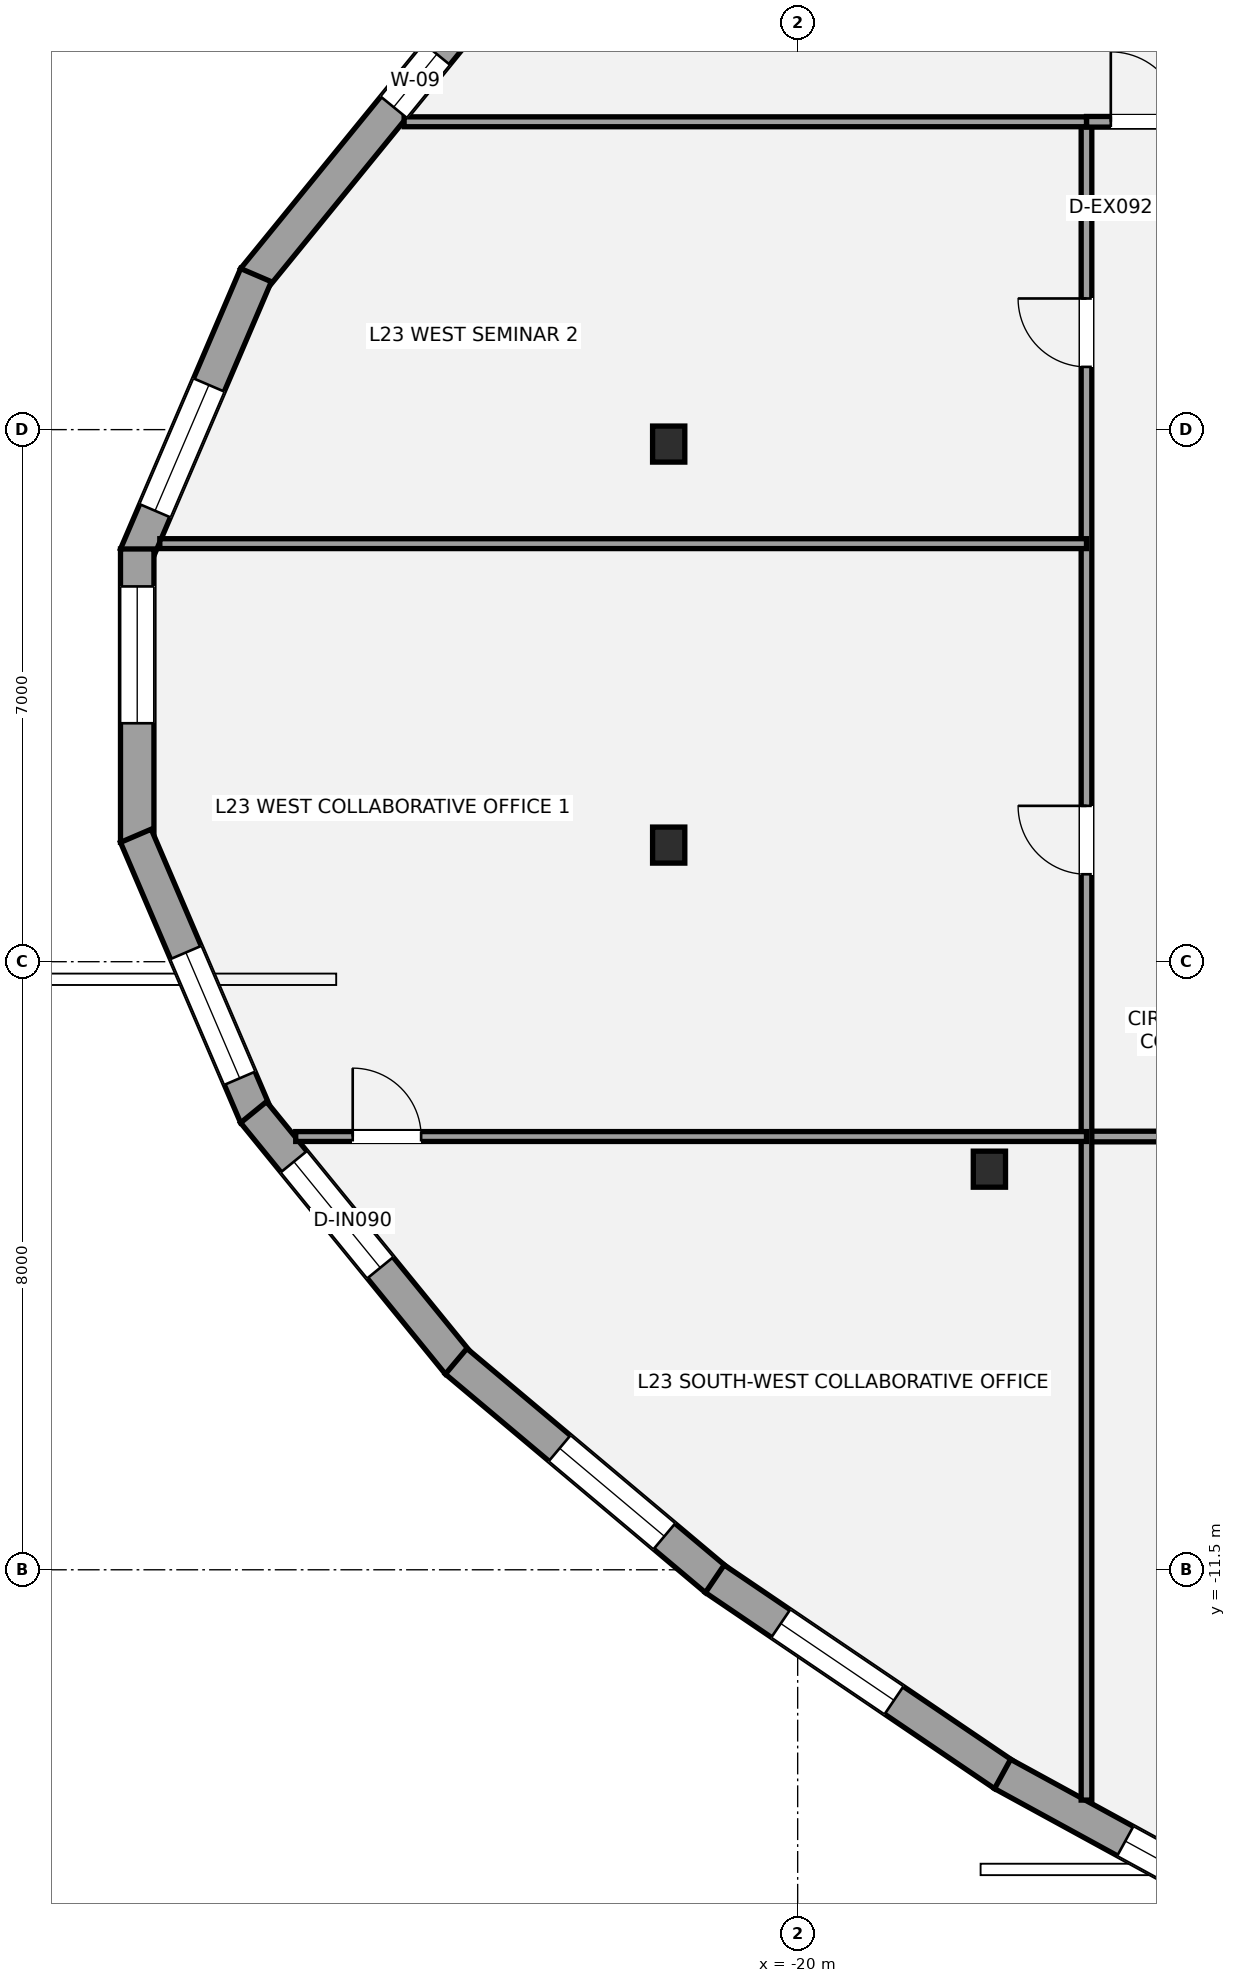
"""IFC4 building model, lengths in metres.
Left out: names, types, materials, properties, quantities, classifications, styles, units other than length and angle.
Written with IfcOpenShell. Run it as: python <this file> out.ifc"""

import sys

from ifc_helpers import new_model, si_unit, direction, frame, frame_2d, origin, origin_2d, place, context, subcontext, project, spatial, rectangle, i_section, extrude, element, fill, save


model = new_model("IFC4")
c1 = context("Model", 3, precision=1e-05, world=origin(), true_north=direction((0.0, 1.0)))
c2 = subcontext(c1, "Body", "Model", "MODEL_VIEW")
j1 = project(units=[si_unit("LENGTHUNIT", "METRE"), si_unit("PLANEANGLEUNIT", "RADIAN")], contexts=[c1])
p1 = place(None, origin())
s1 = spatial("IfcSite", under=j1, at=p1, CompositionType="ELEMENT")
p2 = place(p1, origin())
s2 = spatial("IfcBuilding", under=s1, at=p2, CompositionType="ELEMENT")
p3 = place(p2, frame((0.0, 0.0, 89.6)))
s3 = spatial("IfcBuildingStorey", under=s2, at=p3, CompositionType="ELEMENT", Elevation=89.6)
for number, where, z_axis, x_axis in (
    (1, (-21.697, 3.31, 0.0), (0.0, 0.0, 1.0), (1.0, 0.0, 0.0)),
    (2, (-21.697, -1.966, 0.0), (0.0, 0.0, 1.0), (1.0, 0.0, 0.0)),
    (3, (-17.477, -6.229, 0.0), (0.0, 0.0, 1.0), (1.0, 0.0, 0.0)),
):
    element("IfcColumn", number, at=place(p3, frame(where, z_axis=z_axis, x_axis=x_axis)), inside=s3, PredefinedType="COLUMN", context=c2, shape_type="SweptSolid", body=[
        extrude(i_section(OverallWidth=0.424, OverallDepth=0.474, WebThickness=0.048, FlangeThickness=0.077, at=origin_2d()), origin(), (0.0, 0.0, 1.0), 3.5),
    ])
p4 = place(p3, frame((-27.159, 5.48, 0.0), z_axis=(0.0, 0.0, 1.0), x_axis=(0.631768505266, 0.775157116818, 0.0)))
e4 = element("IfcWall", 4, at=p4, inside=s3, PredefinedType="STANDARD", context=c2, shape_type="SweptSolid", body=[
    extrude(rectangle(XDim=4.265, YDim=0.44, at=frame_2d((2.133, 0.0))), origin(), (0.0, 0.0, 1.0), 2.528),
])
p5 = place(p4, frame((2.918, 0.0, 0.58)))
e5 = element("IfcOpeningElement", 5, at=p5, cuts=e4, PredefinedType="OPENING", context=c2, shape_type="SweptSolid", body=[
    extrude(rectangle(XDim=0.9, YDim=1.35, at=frame_2d((0.45, 0.675))), frame((0.0, 0.23, 0.0), z_axis=(0.0, -1.0, 0.0), x_axis=(1.0, 0.0, 0.0)), (0.0, 0.0, 1.0), 0.46),
])
p6 = place(p3, frame((-28.708, 1.844, 0.0), z_axis=(0.0, 0.0, 1.0), x_axis=(0.393757776232, 0.919214237083, 0.0)))
e6 = element("IfcWall", 6, at=p6, inside=s3, PredefinedType="STANDARD", context=c2, shape_type="SweptSolid", body=[
    extrude(rectangle(XDim=4.013, YDim=0.44, at=frame_2d((2.007, 0.0))), origin(), (0.0, 0.0, 1.0), 2.528),
])
p7 = place(p6, frame((0.641, 0.0, 0.65)))
e7 = element("IfcOpeningElement", 7, at=p7, cuts=e6, PredefinedType="OPENING", context=c2, shape_type="SweptSolid", body=[
    extrude(rectangle(XDim=1.8, YDim=1.7, at=frame_2d((0.9, 0.85))), frame((0.0, 0.23, 0.0), z_axis=(0.0, -1.0, 0.0), x_axis=(1.0, 0.0, 0.0)), (0.0, 0.0, 1.0), 0.46),
])
p8 = place(p3, frame((-28.69, -1.93, 0.0), z_axis=(0.0, 0.0, 1.0), x_axis=(0.0, 1.0, 0.0)))
e8 = element("IfcWall", 8, at=p8, inside=s3, PredefinedType="STANDARD", context=c2, shape_type="SweptSolid", body=[
    extrude(rectangle(XDim=3.86, YDim=0.44, at=frame_2d((1.93, 0.0))), origin(), (0.0, 0.0, 1.0), 2.528),
])
p9 = place(p8, frame((1.567, 0.0, 0.65)))
e9 = element("IfcOpeningElement", 9, at=p9, cuts=e8, PredefinedType="OPENING", context=c2, shape_type="SweptSolid", body=[
    extrude(rectangle(XDim=1.8, YDim=1.7, at=frame_2d((0.9, 0.85))), frame((0.0, 0.23, 0.0), z_axis=(0.0, -1.0, 0.0), x_axis=(1.0, 0.0, 0.0)), (0.0, 0.0, 1.0), 0.46),
])
p10 = place(p3, frame((-27.127, -5.533, 0.0), z_axis=(0.0, 0.0, 1.0), x_axis=(-0.393757776232, 0.919214237083, 0.0)))
e10 = element("IfcWall", 10, at=p10, inside=s3, PredefinedType="STANDARD", context=c2, shape_type="SweptSolid", body=[
    extrude(rectangle(XDim=4.013, YDim=0.44, at=frame_2d((2.007, 0.0))), origin(), (0.0, 0.0, 1.0), 2.528),
])
p11 = place(p10, frame((0.543, 0.0, 0.65)))
e11 = element("IfcOpeningElement", 11, at=p11, cuts=e10, PredefinedType="OPENING", context=c2, shape_type="SweptSolid", body=[
    extrude(rectangle(XDim=1.8, YDim=1.7, at=frame_2d((0.9, 0.85))), frame((0.0, 0.23, 0.0), z_axis=(0.0, -1.0, 0.0), x_axis=(1.0, 0.0, 0.0)), (0.0, 0.0, 1.0), 0.46),
])
p12 = place(p3, frame((-24.464, -8.787, 0.0), z_axis=(0.0, 0.0, 1.0), x_axis=(-0.631768505266, 0.775157116818, 0.0)))
e12 = element("IfcWall", 12, at=p12, inside=s3, PredefinedType="STANDARD", context=c2, shape_type="SweptSolid", body=[
    extrude(rectangle(XDim=4.265, YDim=0.44, at=frame_2d((2.133, 0.0))), origin(), (0.0, 0.0, 1.0), 2.528),
])
p13 = place(p12, frame((1.626, 0.0, 0.65)))
e13 = element("IfcOpeningElement", 13, at=p13, cuts=e12, PredefinedType="OPENING", context=c2, shape_type="SweptSolid", body=[
    extrude(rectangle(XDim=1.8, YDim=1.7, at=frame_2d((0.9, 0.85))), frame((0.0, 0.23, 0.0), z_axis=(0.0, -1.0, 0.0), x_axis=(1.0, 0.0, 0.0)), (0.0, 0.0, 1.0), 0.46),
])
p14 = place(p3, frame((-21.072, -11.632, 0.0), z_axis=(0.0, 0.0, 1.0), x_axis=(-0.765563867956, 0.643359902449, 0.0)))
e14 = element("IfcWall", 14, at=p14, inside=s3, PredefinedType="STANDARD", context=c2, shape_type="SweptSolid", body=[
    extrude(rectangle(XDim=4.469, YDim=0.44, at=frame_2d((2.234, 0.0))), origin(), (0.0, 0.0, 1.0), 2.528),
])
p15 = place(p14, frame((0.891, 0.0, 0.65)))
e15 = element("IfcOpeningElement", 15, at=p15, cuts=e14, PredefinedType="OPENING", context=c2, shape_type="SweptSolid", body=[
    extrude(rectangle(XDim=1.8, YDim=1.7, at=frame_2d((0.9, 0.85))), frame((0.0, 0.23, 0.0), z_axis=(0.0, -1.0, 0.0), x_axis=(1.0, 0.0, 0.0)), (0.0, 0.0, 1.0), 0.46),
])
p16 = place(p3, frame((-17.286, -14.197, 0.0), z_axis=(0.0, 0.0, 1.0), x_axis=(-0.827742791179, 0.561107718403, 0.0)))
e16 = element("IfcWall", 16, at=p16, inside=s3, PredefinedType="STANDARD", context=c2, shape_type="SweptSolid", body=[
    extrude(rectangle(XDim=4.595, YDim=0.44, at=frame_2d((2.298, 0.0))), origin(), (0.0, 0.0, 1.0), 2.528),
])
p17 = place(p16, frame((1.747, 0.0, 0.65)))
e17 = element("IfcOpeningElement", 17, at=p17, cuts=e16, PredefinedType="OPENING", context=c2, shape_type="SweptSolid", body=[
    extrude(rectangle(XDim=1.8, YDim=1.7, at=frame_2d((0.9, 0.85))), frame((0.0, 0.23, 0.0), z_axis=(0.0, -1.0, 0.0), x_axis=(1.0, 0.0, 0.0)), (0.0, 0.0, 1.0), 0.46),
])
p18 = place(p3, frame((-13.062, -16.505, 0.0), z_axis=(0.0, 0.0, 1.0), x_axis=(-0.877445532469, 0.479676284123, 0.0)))
e18 = element("IfcWall", 18, at=p18, inside=s3, PredefinedType="STANDARD", context=c2, shape_type="SweptSolid", body=[
    extrude(rectangle(XDim=4.835, YDim=0.44, at=frame_2d((2.417, 0.0))), origin(), (0.0, 0.0, 1.0), 2.528),
])
p19 = place(p18, frame((1.194, 0.0, 0.65)))
e19 = element("IfcOpeningElement", 19, at=p19, cuts=e18, PredefinedType="OPENING", context=c2, shape_type="SweptSolid", body=[
    extrude(rectangle(XDim=1.8, YDim=1.7, at=frame_2d((0.9, 0.85))), frame((0.0, 0.23, 0.0), z_axis=(0.0, -1.0, 0.0), x_axis=(1.0, 0.0, 0.0)), (0.0, 0.0, 1.0), 0.46),
])
p20 = place(p3, frame((-16.2, -5.8, 0.0), z_axis=(0.0, 0.0, 1.0), x_axis=(1.0, 0.0, 0.0)))
e20 = element("IfcWall", 20, at=p20, inside=s3, PredefinedType="PARTITIONING", context=c2, shape_type="SweptSolid", body=[
    extrude(rectangle(XDim=32.4, YDim=0.14, at=frame_2d((16.2, 0.0))), origin(), (0.0, 0.0, 1.0), 2.763),
])
p21 = place(p20, frame((4.25, 0.0, 0.0)))
e21 = element("IfcOpeningElement", 21, at=p21, cuts=e20, PredefinedType="OPENING", context=c2, shape_type="SweptSolid", body=[
    extrude(rectangle(XDim=0.9, YDim=2.1, at=frame_2d((0.45, 1.05))), frame((0.0, 0.08, 0.0), z_axis=(0.0, -1.0, 0.0), x_axis=(1.0, 0.0, 0.0)), (0.0, 0.0, 1.0), 0.16),
])
p22 = place(p20, frame((13.15, 0.0, 0.0)))
e22 = element("IfcOpeningElement", 22, at=p22, cuts=e20, PredefinedType="OPENING", context=c2, shape_type="SweptSolid", body=[
    extrude(rectangle(XDim=1.5, YDim=2.15, at=frame_2d((0.75, 1.075))), frame((0.0, 0.08, 0.0), z_axis=(0.0, -1.0, 0.0), x_axis=(1.0, 0.0, 0.0)), (0.0, 0.0, 1.0), 0.16),
])
p23 = place(p20, frame((21.45, 0.0, 0.0)))
e23 = element("IfcOpeningElement", 23, at=p23, cuts=e20, PredefinedType="OPENING", context=c2, shape_type="SweptSolid", body=[
    extrude(rectangle(XDim=0.9, YDim=2.1, at=frame_2d((0.45, 1.05))), frame((0.0, 0.08, 0.0), z_axis=(0.0, -1.0, 0.0), x_axis=(1.0, 0.0, 0.0)), (0.0, 0.0, 1.0), 0.16),
])
p24 = place(p20, frame((28.15, 0.0, 0.0)))
e24 = element("IfcOpeningElement", 24, at=p24, cuts=e20, PredefinedType="OPENING", context=c2, shape_type="SweptSolid", body=[
    extrude(rectangle(XDim=1.5, YDim=2.15, at=frame_2d((0.75, 1.075))), frame((0.0, 0.08, 0.0), z_axis=(0.0, -1.0, 0.0), x_axis=(1.0, 0.0, 0.0)), (0.0, 0.0, 1.0), 0.16),
])
p25 = place(p3, frame((-16.2, -14.53, 0.0), z_axis=(0.0, 0.0, 1.0), x_axis=(0.0, 1.0, 0.0)))
e25 = element("IfcWall", 25, at=p25, inside=s3, PredefinedType="PARTITIONING", context=c2, shape_type="SweptSolid", body=[
    extrude(rectangle(XDim=22.08, YDim=0.14, at=frame_2d((11.04, 0.0))), origin(), (0.0, 0.0, 1.0), 2.751),
])
p26 = place(p25, frame((12.18, 0.0, 0.0)))
e26 = element("IfcOpeningElement", 26, at=p26, cuts=e25, PredefinedType="OPENING", context=c2, shape_type="SweptSolid", body=[
    extrude(rectangle(XDim=0.9, YDim=2.1, at=frame_2d((0.45, 1.05))), frame((0.0, 0.08, 0.0), z_axis=(0.0, -1.0, 0.0), x_axis=(1.0, 0.0, 0.0)), (0.0, 0.0, 1.0), 0.16),
])
p27 = place(p25, frame((18.855, 0.0, 0.0)))
e27 = element("IfcOpeningElement", 27, at=p27, cuts=e25, PredefinedType="OPENING", context=c2, shape_type="SweptSolid", body=[
    extrude(rectangle(XDim=0.9, YDim=2.1, at=frame_2d((0.45, 1.05))), frame((0.0, 0.08, 0.0), z_axis=(0.0, -1.0, 0.0), x_axis=(1.0, 0.0, 0.0)), (0.0, 0.0, 1.0), 0.16),
])
p28 = place(p3, frame((-16.2, 7.55, 0.0), z_axis=(0.0, 0.0, 1.0), x_axis=(1.0, 0.0, 0.0)))
e28 = element("IfcWall", 28, at=p28, inside=s3, PredefinedType="PARTITIONING", context=c2, shape_type="SweptSolid", body=[
    extrude(rectangle(XDim=2.3, YDim=0.14, at=frame_2d((1.15, 0.0))), origin(), (0.0, 0.0, 1.0), 2.763),
])
p29 = place(p28, frame((0.32, 0.0, 0.0)))
e29 = element("IfcOpeningElement", 29, at=p29, cuts=e28, PredefinedType="OPENING", context=c2, shape_type="SweptSolid", body=[
    extrude(rectangle(XDim=0.92, YDim=2.15, at=frame_2d((0.46, 1.075))), frame((0.0, 0.08, 0.0), z_axis=(0.0, -1.0, 0.0), x_axis=(1.0, 0.0, 0.0)), (0.0, 0.0, 1.0), 0.16),
])
p30 = place(p3, frame((-25.178, 7.55, 0.0), z_axis=(0.0, 0.0, 1.0), x_axis=(1.0, 0.0, 0.0)))
e30 = element("IfcWall", 30, at=p30, inside=s3, PredefinedType="PARTITIONING", context=c2, shape_type="SweptSolid", body=[
    extrude(rectangle(XDim=8.978, YDim=0.13, at=frame_2d((4.489, 0.0))), origin(), (0.0, 0.0, 1.0), 2.763),
])
p31 = place(p3, frame((-26.604, -5.8, 0.0), z_axis=(0.0, 0.0, 1.0), x_axis=(1.0, 0.0, 0.0)))
e31 = element("IfcWall", 31, at=p31, inside=s3, PredefinedType="PARTITIONING", context=c2, shape_type="SweptSolid", body=[
    extrude(rectangle(XDim=10.404, YDim=0.13, at=frame_2d((5.202, 0.0))), origin(), (0.0, 0.0, 1.0), 2.688),
])
p32 = place(p31, frame((0.75, 0.0, 0.0)))
e32 = element("IfcOpeningElement", 32, at=p32, cuts=e31, PredefinedType="OPENING", context=c2, shape_type="SweptSolid", body=[
    extrude(rectangle(XDim=0.9, YDim=2.1, at=frame_2d((0.45, 1.05))), frame((0.0, 0.075, 0.0), z_axis=(0.0, -1.0, 0.0), x_axis=(1.0, 0.0, 0.0)), (0.0, 0.0, 1.0), 0.15),
])
p33 = place(p3, frame((-28.392, 2.0, 0.0), z_axis=(0.0, 0.0, 1.0), x_axis=(1.0, 0.0, 0.0)))
e33 = element("IfcWall", 33, at=p33, inside=s3, PredefinedType="PARTITIONING", context=c2, shape_type="SweptSolid", body=[
    extrude(rectangle(XDim=12.192, YDim=0.13, at=frame_2d((6.096, 0.0))), origin(), (0.0, 0.0, 1.0), 2.751),
])
p34 = place(p5, origin())
e34 = element("IfcWindow", 34, at=p34, inside=s3, PartitioningType="SINGLE_PANEL", PredefinedType="WINDOW", context=c2, shape_type="SweptSolid", body=[
    extrude(rectangle(XDim=0.9, YDim=1.35, at=frame_2d((0.45, 0.675))), frame((0.0, -0.01, 0.0), z_axis=(0.0, -1.0, 0.0), x_axis=(1.0, 0.0, 0.0)), (0.0, 0.0, 1.0), 0.06),
])
fill(e5, e34)
p35 = place(p7, origin())
e35 = element("IfcWindow", 35, at=p35, inside=s3, PartitioningType="SINGLE_PANEL", PredefinedType="WINDOW", context=c2, shape_type="SweptSolid", body=[
    extrude(rectangle(XDim=1.8, YDim=1.7, at=frame_2d((0.9, 0.85))), frame((0.0, -0.01, 0.0), z_axis=(0.0, -1.0, 0.0), x_axis=(1.0, 0.0, 0.0)), (0.0, 0.0, 1.0), 0.06),
])
fill(e7, e35)
p36 = place(p9, origin())
e36 = element("IfcWindow", 36, at=p36, inside=s3, PartitioningType="SINGLE_PANEL", PredefinedType="WINDOW", context=c2, shape_type="SweptSolid", body=[
    extrude(rectangle(XDim=1.8, YDim=1.7, at=frame_2d((0.9, 0.85))), frame((0.0, -0.01, 0.0), z_axis=(0.0, -1.0, 0.0), x_axis=(1.0, 0.0, 0.0)), (0.0, 0.0, 1.0), 0.06),
])
fill(e9, e36)
p37 = place(p11, origin())
e37 = element("IfcWindow", 37, at=p37, inside=s3, PartitioningType="SINGLE_PANEL", PredefinedType="WINDOW", context=c2, shape_type="SweptSolid", body=[
    extrude(rectangle(XDim=1.8, YDim=1.7, at=frame_2d((0.9, 0.85))), frame((0.0, -0.01, 0.0), z_axis=(0.0, -1.0, 0.0), x_axis=(1.0, 0.0, 0.0)), (0.0, 0.0, 1.0), 0.06),
])
fill(e11, e37)
p38 = place(p13, origin())
e38 = element("IfcWindow", 38, at=p38, inside=s3, PartitioningType="SINGLE_PANEL", PredefinedType="WINDOW", context=c2, shape_type="SweptSolid", body=[
    extrude(rectangle(XDim=1.8, YDim=1.7, at=frame_2d((0.9, 0.85))), frame((0.0, -0.01, 0.0), z_axis=(0.0, -1.0, 0.0), x_axis=(1.0, 0.0, 0.0)), (0.0, 0.0, 1.0), 0.06),
])
fill(e13, e38)
p39 = place(p15, origin())
e39 = element("IfcWindow", 39, at=p39, inside=s3, PartitioningType="SINGLE_PANEL", PredefinedType="WINDOW", context=c2, shape_type="SweptSolid", body=[
    extrude(rectangle(XDim=1.8, YDim=1.7, at=frame_2d((0.9, 0.85))), frame((0.0, -0.01, 0.0), z_axis=(0.0, -1.0, 0.0), x_axis=(1.0, 0.0, 0.0)), (0.0, 0.0, 1.0), 0.06),
])
fill(e15, e39)
p40 = place(p17, origin())
e40 = element("IfcWindow", 40, at=p40, inside=s3, PartitioningType="SINGLE_PANEL", PredefinedType="WINDOW", context=c2, shape_type="SweptSolid", body=[
    extrude(rectangle(XDim=1.8, YDim=1.7, at=frame_2d((0.9, 0.85))), frame((0.0, -0.01, 0.0), z_axis=(0.0, -1.0, 0.0), x_axis=(1.0, 0.0, 0.0)), (0.0, 0.0, 1.0), 0.06),
])
fill(e17, e40)
p41 = place(p19, origin())
e41 = element("IfcWindow", 41, at=p41, inside=s3, PartitioningType="SINGLE_PANEL", PredefinedType="WINDOW", context=c2, shape_type="SweptSolid", body=[
    extrude(rectangle(XDim=1.8, YDim=1.7, at=frame_2d((0.9, 0.85))), frame((0.0, -0.01, 0.0), z_axis=(0.0, -1.0, 0.0), x_axis=(1.0, 0.0, 0.0)), (0.0, 0.0, 1.0), 0.06),
])
fill(e19, e41)
p42 = place(p29, origin())
e42 = element("IfcDoor", 42, at=p42, inside=s3, OperationType="SINGLE_SWING_LEFT", PredefinedType="DOOR", context=c2, shape_type="SweptSolid", body=[
    extrude(rectangle(XDim=0.92, YDim=2.15, at=frame_2d((0.46, 1.075))), frame((0.0, 0.025, 0.0), z_axis=(0.0, -1.0, 0.0), x_axis=(1.0, 0.0, 0.0)), (0.0, 0.0, 1.0), 0.05),
])
fill(e29, e42)
p43 = place(p32, origin())
e43 = element("IfcDoor", 43, at=p43, inside=s3, OperationType="SINGLE_SWING_LEFT", PredefinedType="DOOR", context=c2, shape_type="SweptSolid", body=[
    extrude(rectangle(XDim=0.9, YDim=2.1, at=frame_2d((0.45, 1.05))), frame((0.0, 0.025, 0.0), z_axis=(0.0, -1.0, 0.0), x_axis=(1.0, 0.0, 0.0)), (0.0, 0.0, 1.0), 0.05),
])
fill(e32, e43)
p44 = place(p26, origin())
e44 = element("IfcDoor", 44, at=p44, inside=s3, OperationType="SINGLE_SWING_RIGHT", PredefinedType="DOOR", context=c2, shape_type="SweptSolid", body=[
    extrude(rectangle(XDim=0.9, YDim=2.1, at=frame_2d((0.45, 1.05))), frame((0.0, 0.025, 0.0), z_axis=(0.0, -1.0, 0.0), x_axis=(1.0, 0.0, 0.0)), (0.0, 0.0, 1.0), 0.05),
])
fill(e26, e44)
p45 = place(p27, origin())
e45 = element("IfcDoor", 45, at=p45, inside=s3, OperationType="SINGLE_SWING_RIGHT", PredefinedType="DOOR", context=c2, shape_type="SweptSolid", body=[
    extrude(rectangle(XDim=0.9, YDim=2.1, at=frame_2d((0.45, 1.05))), frame((0.0, 0.025, 0.0), z_axis=(0.0, -1.0, 0.0), x_axis=(1.0, 0.0, 0.0)), (0.0, 0.0, 1.0), 0.05),
])
fill(e27, e45)
save(model, sys.argv[1])
